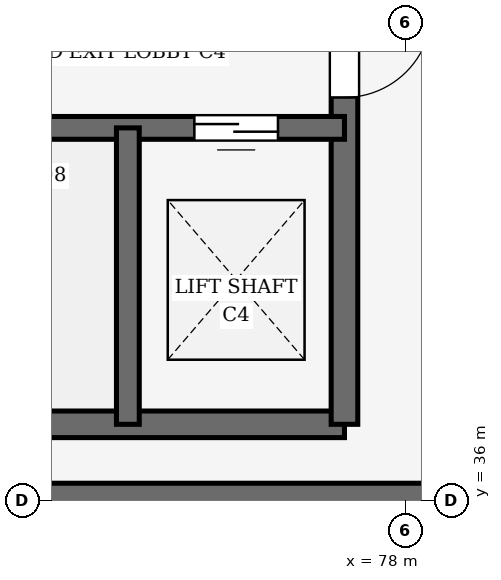
"""IFC4 building model, lengths in metres.
Left out: names, types, materials, properties, quantities, classifications, styles, units other than length and angle.
Written with IfcOpenShell. Run it as: python <this file> out.ifc"""

import sys

from ifc_helpers import new_model, si_unit, direction, frame, frame_2d, origin, place, context, subcontext, project, spatial, rectangle, extrude, element, fill, save


model = new_model("IFC4")
c1 = context("Model", 3, precision=1e-05, world=origin(), true_north=direction((0.0, 1.0)))
c2 = subcontext(c1, "Body", "Model", "MODEL_VIEW")
j1 = project(units=[si_unit("LENGTHUNIT", "METRE"), si_unit("PLANEANGLEUNIT", "RADIAN")], contexts=[c1])
p1 = place(None, origin())
s1 = spatial("IfcSite", under=j1, at=p1, CompositionType="ELEMENT")
p2 = place(p1, origin())
s2 = spatial("IfcBuilding", under=s1, at=p2, CompositionType="ELEMENT")
p3 = place(p2, origin())
s3 = spatial("IfcBuildingStorey", under=s2, at=p3, CompositionType="ELEMENT", Elevation=0.0)
p4 = place(p3, frame((66.0, 36.0, 0.0), z_axis=(0.0, 0.0, 1.0), x_axis=(1.0, 0.0, 0.0)))
e1 = element("IfcWall", 1, at=p4, inside=s3, PredefinedType="SOLIDWALL", context=c2, shape_type="SweptSolid", body=[
    extrude(rectangle(XDim=18.0, YDim=0.45, at=frame_2d((9.0, 0.0))), origin(), (0.0, 0.0, 1.0), 4.65),
])
p5 = place(p3, frame((67.0, 37.0, 0.0), z_axis=(0.0, 0.0, 1.0), x_axis=(1.0, 0.0, 0.0)))
e2 = element("IfcWall", 2, at=p5, inside=s3, PredefinedType="SHEAR", context=c2, shape_type="SweptSolid", body=[
    extrude(rectangle(XDim=10.2, YDim=0.35, at=frame_2d((5.1, 0.0))), origin(), (0.0, 0.0, 1.0), 5.4),
])
p6 = place(p3, frame((77.2, 37.0, 0.0), z_axis=(0.0, 0.0, 1.0), x_axis=(0.0, 1.0, 0.0)))
e3 = element("IfcWall", 3, at=p6, inside=s3, PredefinedType="SHEAR", context=c2, shape_type="SweptSolid", body=[
    extrude(rectangle(XDim=8.4, YDim=0.35, at=frame_2d((4.2, 0.0))), origin(), (0.0, 0.0, 1.0), 5.4),
])
p7 = place(p6, frame((4.3, 0.0, 0.0)))
e4 = element("IfcOpeningElement", 4, at=p7, cuts=e3, PredefinedType="OPENING", context=c2, shape_type="SweptSolid", body=[
    extrude(rectangle(XDim=1.15, YDim=2.15, at=frame_2d((0.575, 1.075))), frame((0.0, 0.185, 0.0), z_axis=(0.0, -1.0, 0.0), x_axis=(1.0, 0.0, 0.0)), (0.0, 0.0, 1.0), 0.37),
])
p8 = place(p3, frame((67.0, 40.9, 0.0), z_axis=(0.0, 0.0, 1.0), x_axis=(1.0, 0.0, 0.0)))
e5 = element("IfcWall", 5, at=p8, inside=s3, PredefinedType="SHEAR", context=c2, shape_type="SweptSolid", body=[
    extrude(rectangle(XDim=10.2, YDim=0.3, at=frame_2d((5.1, 0.0))), origin(), (0.0, 0.0, 1.0), 5.4),
])
p9 = place(p8, frame((0.28, 0.0, 0.0)))
e6 = element("IfcOpeningElement", 6, at=p9, cuts=e5, PredefinedType="OPENING", context=c2, shape_type="SweptSolid", body=[
    extrude(rectangle(XDim=1.45, YDim=2.15, at=frame_2d((0.725, 1.075))), frame((0.0, 0.16, 0.0), z_axis=(0.0, -1.0, 0.0), x_axis=(1.0, 0.0, 0.0)), (0.0, 0.0, 1.0), 0.32),
])
p10 = place(p8, frame((8.225, 0.0, 0.0)))
e7 = element("IfcOpeningElement", 7, at=p10, cuts=e5, PredefinedType="OPENING", context=c2, shape_type="SweptSolid", body=[
    extrude(rectangle(XDim=1.1, YDim=2.15, at=frame_2d((0.55, 1.075))), frame((0.0, 0.16, 0.0), z_axis=(0.0, -1.0, 0.0), x_axis=(1.0, 0.0, 0.0)), (0.0, 0.0, 1.0), 0.32),
])
p11 = place(p3, frame((74.35, 37.0, 0.0), z_axis=(0.0, 0.0, 1.0), x_axis=(0.0, 1.0, 0.0)))
e8 = element("IfcWall", 8, at=p11, inside=s3, PredefinedType="SHEAR", context=c2, shape_type="SweptSolid", body=[
    extrude(rectangle(XDim=3.9, YDim=0.3, at=frame_2d((1.95, 0.0))), origin(), (0.0, 0.0, 1.0), 5.4),
])
p12 = place(p7, frame((1.15, 0.0, 0.0), z_axis=(0.0, 0.0, 1.0), x_axis=(-1.0, 0.0, 0.0)))
e9 = element("IfcDoor", 9, at=p12, inside=s3, OperationType="SINGLE_SWING_LEFT", PredefinedType="DOOR", context=c2, shape_type="SweptSolid", body=[
    extrude(rectangle(XDim=1.15, YDim=2.15, at=frame_2d((0.575, 1.075))), frame((0.0, 0.025, 0.0), z_axis=(0.0, -1.0, 0.0), x_axis=(1.0, 0.0, 0.0)), (0.0, 0.0, 1.0), 0.05),
])
fill(e4, e9)
p13 = place(p10, origin())
e10 = element("IfcDoor", 10, at=p13, inside=s3, OperationType="DOUBLE_DOOR_SLIDING", PredefinedType="DOOR", context=c2, shape_type="SweptSolid", body=[
    extrude(rectangle(XDim=1.1, YDim=2.15, at=frame_2d((0.55, 1.075))), frame((0.0, 0.025, 0.0), z_axis=(0.0, -1.0, 0.0), x_axis=(1.0, 0.0, 0.0)), (0.0, 0.0, 1.0), 0.05),
])
fill(e7, e10)
save(model, sys.argv[1])
